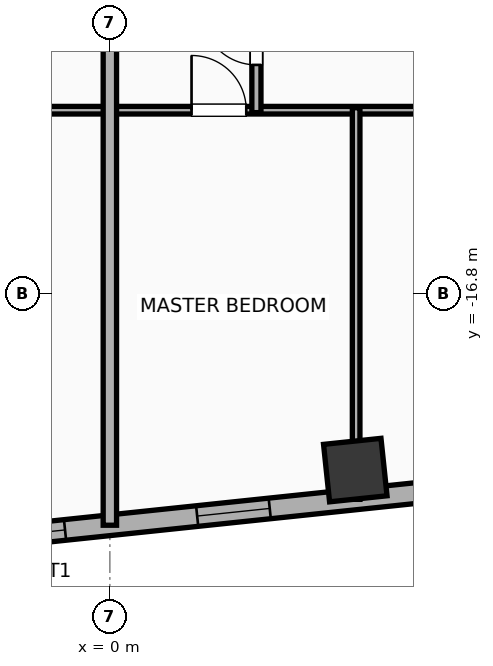
"""IFC4 building model, lengths in metres.
Left out: names, types, materials, properties, quantities, classifications, styles, units other than length and angle.
Written with IfcOpenShell. Run it as: python <this file> out.ifc"""

import sys

from ifc_helpers import new_model, si_unit, direction, frame, frame_2d, origin, origin_2d, place, context, subcontext, project, spatial, rectangle, hollow_rectangle, extrude, element, fill, save


model = new_model("IFC4")
c1 = context("Model", 3, precision=1e-05, world=origin(), true_north=direction((0.0, 1.0)))
c2 = subcontext(c1, "Body", "Model", "MODEL_VIEW")
j1 = project(units=[si_unit("LENGTHUNIT", "METRE"), si_unit("PLANEANGLEUNIT", "RADIAN")], contexts=[c1])
p1 = place(None, origin())
s1 = spatial("IfcSite", under=j1, at=p1, CompositionType="ELEMENT")
p2 = place(p1, origin())
s2 = spatial("IfcBuilding", under=s1, at=p2, CompositionType="ELEMENT")
p3 = place(p2, frame((0.0, 0.0, 159.9)))
s3 = spatial("IfcBuildingStorey", under=s2, at=p3, CompositionType="ELEMENT", Elevation=159.9)
p4 = place(p3, frame((4.036, -19.698, 0.0), z_axis=(0.0, 0.0, 1.0), x_axis=(0.994521895368, 0.104528463268, 0.0)))
e1 = element("IfcColumn", 1, at=p4, inside=s3, PredefinedType="COLUMN", context=c2, shape_type="SweptSolid", body=[
    extrude(hollow_rectangle(XDim=0.95, YDim=0.95, WallThickness=0.032, at=origin_2d()), origin(), (0.0, 0.0, 1.0), 3.9),
])
p5 = place(p3, frame((24.756, -18.003, 0.0), z_axis=(0.0, 0.0, 1.0), x_axis=(-0.99452160744, -0.104531202687, 0.0)))
e2 = element("IfcWall", 2, at=p5, inside=s3, PredefinedType="ELEMENTEDWALL", context=c2, shape_type="SweptSolid", body=[
    extrude(rectangle(XDim=51.967, YDim=0.34, at=frame_2d((25.983, 0.0))), origin(), (0.0, 0.0, 1.0), 3.65),
])
p6 = place(p5, frame((25.633, 0.0, 0.75)))
e3 = element("IfcOpeningElement", 3, at=p6, cuts=e2, PredefinedType="OPENING", context=c2, shape_type="SweptSolid", body=[
    extrude(rectangle(XDim=2.4, YDim=2.1, at=frame_2d((1.2, 1.05))), frame((0.0, 0.18, 0.0), z_axis=(0.0, -1.0, 0.0), x_axis=(1.0, 0.0, 0.0)), (0.0, 0.0, 1.0), 0.36),
])
p7 = place(p5, frame((42.369, 0.0, 0.75)))
e4 = element("IfcOpeningElement", 4, at=p7, cuts=e2, PredefinedType="OPENING", context=c2, shape_type="SweptSolid", body=[
    extrude(rectangle(XDim=1.2, YDim=2.05, at=frame_2d((0.6, 1.025))), frame((0.0, 0.18, 0.0), z_axis=(0.0, -1.0, 0.0), x_axis=(1.0, 0.0, 0.0)), (0.0, 0.0, 1.0), 0.36),
])
p8 = place(p5, frame((34.085, 0.0, 0.75)))
e5 = element("IfcOpeningElement", 5, at=p8, cuts=e2, PredefinedType="OPENING", context=c2, shape_type="SweptSolid", body=[
    extrude(rectangle(XDim=1.2, YDim=2.05, at=frame_2d((0.6, 1.025))), frame((0.0, 0.18, 0.0), z_axis=(0.0, -1.0, 0.0), x_axis=(1.0, 0.0, 0.0)), (0.0, 0.0, 1.0), 0.36),
])
p9 = place(p5, frame((36.993, 0.0, 0.75)))
e6 = element("IfcOpeningElement", 6, at=p9, cuts=e2, PredefinedType="OPENING", context=c2, shape_type="SweptSolid", body=[
    extrude(rectangle(XDim=1.2, YDim=2.05, at=frame_2d((0.6, 1.025))), frame((0.0, 0.18, 0.0), z_axis=(0.0, -1.0, 0.0), x_axis=(1.0, 0.0, 0.0)), (0.0, 0.0, 1.0), 0.36),
])
p10 = place(p5, frame((14.397, 0.0, 0.75)))
e7 = element("IfcOpeningElement", 7, at=p10, cuts=e2, PredefinedType="OPENING", context=c2, shape_type="SweptSolid", body=[
    extrude(rectangle(XDim=1.2, YDim=2.05, at=frame_2d((0.6, 1.025))), frame((0.0, 0.18, 0.0), z_axis=(0.0, -1.0, 0.0), x_axis=(1.0, 0.0, 0.0)), (0.0, 0.0, 1.0), 0.36),
])
p11 = place(p5, frame((11.489, 0.0, 0.75)))
e8 = element("IfcOpeningElement", 8, at=p11, cuts=e2, PredefinedType="OPENING", context=c2, shape_type="SweptSolid", body=[
    extrude(rectangle(XDim=1.2, YDim=2.05, at=frame_2d((0.6, 1.025))), frame((0.0, 0.18, 0.0), z_axis=(0.0, -1.0, 0.0), x_axis=(1.0, 0.0, 0.0)), (0.0, 0.0, 1.0), 0.36),
])
p12 = place(p5, frame((8.521, 0.0, 0.75)))
e9 = element("IfcOpeningElement", 9, at=p12, cuts=e2, PredefinedType="OPENING", context=c2, shape_type="SweptSolid", body=[
    extrude(rectangle(XDim=1.2, YDim=2.05, at=frame_2d((0.6, 1.025))), frame((0.0, 0.18, 0.0), z_axis=(0.0, -1.0, 0.0), x_axis=(1.0, 0.0, 0.0)), (0.0, 0.0, 1.0), 0.36),
])
p13 = place(p5, frame((5.582, 0.0, 0.75)))
e10 = element("IfcOpeningElement", 10, at=p13, cuts=e2, PredefinedType="OPENING", context=c2, shape_type="SweptSolid", body=[
    extrude(rectangle(XDim=1.2, YDim=2.05, at=frame_2d((0.6, 1.025))), frame((0.0, 0.18, 0.0), z_axis=(0.0, -1.0, 0.0), x_axis=(1.0, 0.0, 0.0)), (0.0, 0.0, 1.0), 0.36),
])
p14 = place(p5, frame((29.313, 0.0, 0.75)))
e11 = element("IfcOpeningElement", 11, at=p14, cuts=e2, PredefinedType="OPENING", context=c2, shape_type="SweptSolid", body=[
    extrude(rectangle(XDim=1.2, YDim=2.05, at=frame_2d((0.6, 1.025))), frame((0.0, 0.18, 0.0), z_axis=(0.0, -1.0, 0.0), x_axis=(1.0, 0.0, 0.0)), (0.0, 0.0, 1.0), 0.36),
])
p15 = place(p5, frame((22.248, 0.0, 0.75)))
e12 = element("IfcOpeningElement", 12, at=p15, cuts=e2, PredefinedType="OPENING", context=c2, shape_type="SweptSolid", body=[
    extrude(rectangle(XDim=1.2, YDim=2.05, at=frame_2d((0.6, 1.025))), frame((0.0, 0.18, 0.0), z_axis=(0.0, -1.0, 0.0), x_axis=(1.0, 0.0, 0.0)), (0.0, 0.0, 1.0), 0.36),
])
p16 = place(p5, frame((18.186, 0.0, 0.75)))
e13 = element("IfcOpeningElement", 13, at=p16, cuts=e2, PredefinedType="OPENING", context=c2, shape_type="SweptSolid", body=[
    extrude(rectangle(XDim=1.2, YDim=2.05, at=frame_2d((0.6, 1.025))), frame((0.0, 0.18, 0.0), z_axis=(0.0, -1.0, 0.0), x_axis=(1.0, 0.0, 0.0)), (0.0, 0.0, 1.0), 0.36),
])
p17 = place(p5, frame((47.879, 0.0, 0.75)))
e14 = element("IfcOpeningElement", 14, at=p17, cuts=e2, PredefinedType="OPENING", context=c2, shape_type="SweptSolid", body=[
    extrude(rectangle(XDim=1.2, YDim=2.05, at=frame_2d((0.6, 1.025))), frame((0.0, 0.18, 0.0), z_axis=(0.0, -1.0, 0.0), x_axis=(1.0, 0.0, 0.0)), (0.0, 0.0, 1.0), 0.36),
])
p18 = place(p5, frame((49.844, 0.0, 0.75)))
e15 = element("IfcOpeningElement", 15, at=p18, cuts=e2, PredefinedType="OPENING", context=c2, shape_type="SweptSolid", body=[
    extrude(rectangle(XDim=1.2, YDim=2.05, at=frame_2d((0.6, 1.025))), frame((0.0, 0.18, 0.0), z_axis=(0.0, -1.0, 0.0), x_axis=(1.0, 0.0, 0.0)), (0.0, 0.0, 1.0), 0.36),
])
p19 = place(p3, frame((-8.08, -13.78, 0.0), z_axis=(0.0, 0.0, 1.0), x_axis=(1.0, 0.0, 0.0)))
e16 = element("IfcWall", 16, at=p19, inside=s3, PredefinedType="PARTITIONING", context=c2, shape_type="SweptSolid", body=[
    extrude(rectangle(XDim=8.06, YDim=0.125, at=frame_2d((4.03, 0.0))), origin(), (0.0, 0.0, 1.0), 3.65),
])
p20 = place(p19, frame((1.323, 0.0, 0.0)))
e17 = element("IfcOpeningElement", 17, at=p20, cuts=e16, PredefinedType="OPENING", context=c2, shape_type="SweptSolid", body=[
    extrude(rectangle(XDim=0.9, YDim=2.05, at=frame_2d((0.45, 1.025))), frame((0.0, 0.073, 0.0), z_axis=(0.0, -1.0, 0.0), x_axis=(1.0, 0.0, 0.0)), (0.0, 0.0, 1.0), 0.145),
])
p21 = place(p19, frame((4.547, 0.0, 0.0)))
e18 = element("IfcOpeningElement", 18, at=p21, cuts=e16, PredefinedType="OPENING", context=c2, shape_type="SweptSolid", body=[
    extrude(rectangle(XDim=0.9, YDim=2.05, at=frame_2d((0.45, 1.025))), frame((0.0, 0.073, 0.0), z_axis=(0.0, -1.0, 0.0), x_axis=(1.0, 0.0, 0.0)), (0.0, 0.0, 1.0), 0.145),
])
p22 = place(p3, frame((0.02, -13.78, 0.0), z_axis=(0.0, 0.0, 1.0), x_axis=(1.0, 0.0, 0.0)))
e19 = element("IfcWall", 19, at=p22, inside=s3, PredefinedType="PARTITIONING", context=c2, shape_type="SweptSolid", body=[
    extrude(rectangle(XDim=8.06, YDim=0.125, at=frame_2d((4.03, 0.0))), origin(), (0.0, 0.0, 1.0), 3.65),
])
p23 = place(p22, frame((1.323, 0.0, 0.0)))
e20 = element("IfcOpeningElement", 20, at=p23, cuts=e19, PredefinedType="OPENING", context=c2, shape_type="SweptSolid", body=[
    extrude(rectangle(XDim=0.9, YDim=2.05, at=frame_2d((0.45, 1.025))), frame((0.0, 0.073, 0.0), z_axis=(0.0, -1.0, 0.0), x_axis=(1.0, 0.0, 0.0)), (0.0, 0.0, 1.0), 0.145),
])
p24 = place(p22, frame((5.837, 0.0, 0.0)))
e21 = element("IfcOpeningElement", 21, at=p24, cuts=e19, PredefinedType="OPENING", context=c2, shape_type="SweptSolid", body=[
    extrude(rectangle(XDim=0.9, YDim=2.05, at=frame_2d((0.45, 1.025))), frame((0.0, 0.073, 0.0), z_axis=(0.0, -1.0, 0.0), x_axis=(1.0, 0.0, 0.0)), (0.0, 0.0, 1.0), 0.145),
])
p25 = place(p3, frame((2.41, -13.82, 0.0), z_axis=(0.0, 0.0, 1.0), x_axis=(0.0, 1.0, 0.0)))
e22 = element("IfcWall", 22, at=p25, inside=s3, PredefinedType="PLUMBINGWALL", context=c2, shape_type="SweptSolid", body=[
    extrude(rectangle(XDim=2.47, YDim=0.15, at=frame_2d((1.235, 0.0))), origin(), (0.0, 0.0, 1.0), 3.65),
])
p26 = place(p25, frame((0.785, 0.0, 0.0)))
e23 = element("IfcOpeningElement", 23, at=p26, cuts=e22, PredefinedType="OPENING", context=c2, shape_type="SweptSolid", body=[
    extrude(rectangle(XDim=0.9, YDim=2.05, at=frame_2d((0.45, 1.025))), frame((0.0, 0.085, 0.0), z_axis=(0.0, -1.0, 0.0), x_axis=(1.0, 0.0, 0.0)), (0.0, 0.0, 1.0), 0.17),
])
p27 = place(p3, frame((4.05, -20.179, 0.0), z_axis=(0.0, 0.0, 1.0), x_axis=(0.0, 1.0, 0.0)))
e24 = element("IfcWall", 24, at=p27, inside=s3, PredefinedType="PARTITIONING", context=c2, shape_type="SweptSolid", body=[
    extrude(rectangle(XDim=6.439, YDim=0.125, at=frame_2d((3.22, 0.0))), origin(), (0.0, 0.0, 1.0), 3.04),
])
p28 = place(p3, frame((0.0, -20.605, 0.0), z_axis=(0.0, 0.0, 1.0), x_axis=(0.0, 1.0, 0.0)))
e25 = element("IfcWall", 25, at=p28, inside=s3, PredefinedType="PARTITIONING", context=c2, shape_type="SweptSolid", body=[
    extrude(rectangle(XDim=11.665, YDim=0.22, at=frame_2d((5.833, 0.0))), origin(), (0.0, 0.0, 1.0), 3.65),
])
p29 = place(p6, origin())
e26 = element("IfcWindow", 26, at=p29, inside=s3, PartitioningType="SINGLE_PANEL", PredefinedType="WINDOW", context=c2, shape_type="SweptSolid", body=[
    extrude(rectangle(XDim=2.4, YDim=2.1, at=frame_2d((1.2, 1.05))), frame((0.0, 0.03, 0.0), z_axis=(0.0, -1.0, 0.0), x_axis=(1.0, 0.0, 0.0)), (0.0, 0.0, 1.0), 0.06),
])
fill(e3, e26)
p30 = place(p15, origin())
e27 = element("IfcWindow", 27, at=p30, inside=s3, PartitioningType="SINGLE_PANEL", PredefinedType="WINDOW", context=c2, shape_type="SweptSolid", body=[
    extrude(rectangle(XDim=1.2, YDim=2.05, at=frame_2d((0.6, 1.025))), frame((0.0, 0.03, 0.0), z_axis=(0.0, -1.0, 0.0), x_axis=(1.0, 0.0, 0.0)), (0.0, 0.0, 1.0), 0.06),
])
fill(e12, e27)
p31 = place(p23, origin())
e28 = element("IfcDoor", 28, at=p31, inside=s3, OperationType="SINGLE_SWING_LEFT", PredefinedType="DOOR", context=c2, shape_type="SweptSolid", body=[
    extrude(rectangle(XDim=0.9, YDim=2.05, at=frame_2d((0.45, 1.025))), frame((0.0, 0.025, 0.0), z_axis=(0.0, -1.0, 0.0), x_axis=(1.0, 0.0, 0.0)), (0.0, 0.0, 1.0), 0.05),
])
fill(e20, e28)
p32 = place(p26, origin())
e29 = element("IfcDoor", 29, at=p32, inside=s3, OperationType="SINGLE_SWING_RIGHT", PredefinedType="DOOR", context=c2, shape_type="SweptSolid", body=[
    extrude(rectangle(XDim=0.9, YDim=2.05, at=frame_2d((0.45, 1.025))), frame((0.0, 0.025, 0.0), z_axis=(0.0, -1.0, 0.0), x_axis=(1.0, 0.0, 0.0)), (0.0, 0.0, 1.0), 0.05),
])
fill(e23, e29)
save(model, sys.argv[1])
